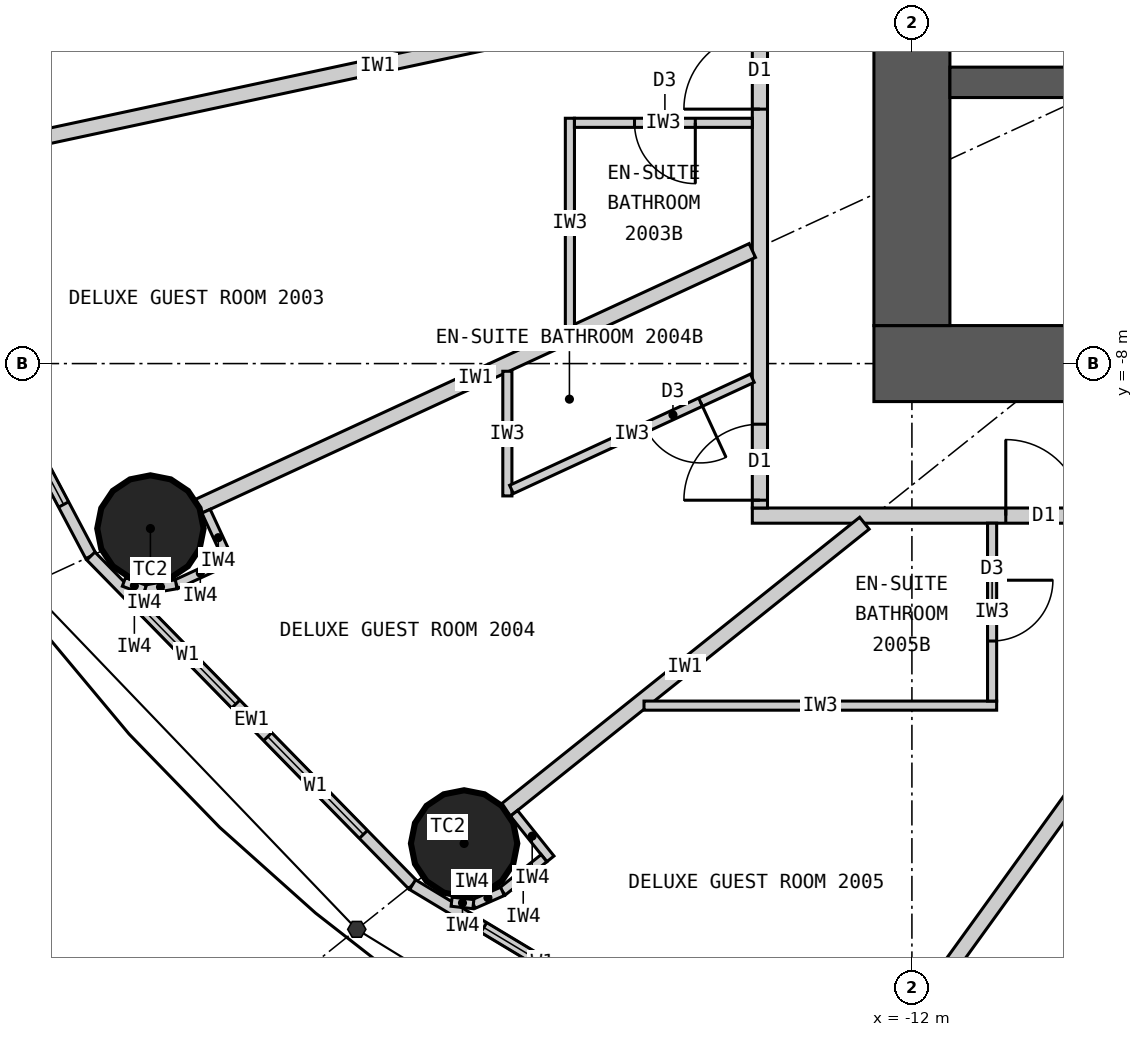
"""IFC4 building model, lengths in metres.
Left out: names, types, materials, properties, quantities, classifications, styles, units other than length and angle.
Written with IfcOpenShell. Run it as: python <this file> out.ifc"""

import sys

from ifc_helpers import new_model, si_unit, direction, frame, frame_2d, origin, origin_2d, place, context, subcontext, project, spatial, rectangle, circle, extrude, element, fill, save


model = new_model("IFC4")
c1 = context("Model", 3, precision=1e-05, world=origin(), true_north=direction((0.0, 1.0)))
c2 = subcontext(c1, "Body", "Model", "MODEL_VIEW")
j1 = project(units=[si_unit("LENGTHUNIT", "METRE"), si_unit("PLANEANGLEUNIT", "RADIAN")], contexts=[c1])
p1 = place(None, origin())
s1 = spatial("IfcSite", under=j1, at=p1, CompositionType="ELEMENT")
p2 = place(p1, origin())
s2 = spatial("IfcBuilding", under=s1, at=p2, CompositionType="ELEMENT")
p3 = place(p2, frame((0.0, 0.0, 80.4)))
s3 = spatial("IfcBuildingStorey", under=s2, at=p3, CompositionType="ELEMENT", Elevation=80.4)
for number, where, z_axis, x_axis in (
    (1, (-22.019, -10.17, 0.0), (0.0, 0.0, 1.0), (1.0, 0.0, 0.0)),
    (2, (-17.892, -14.313, 0.0), (0.0, 0.0, 1.0), (1.0, 0.0, 0.0)),
):
    element("IfcColumn", number, at=place(p3, frame(where, z_axis=z_axis, x_axis=x_axis)), inside=s3, PredefinedType="COLUMN", context=c2, shape_type="SweptSolid", body=[
        extrude(circle(Radius=0.7, at=origin_2d()), origin(), (0.0, 0.0, 1.0), 3.3),
    ])
p4 = place(p3, frame((12.5, -8.0, 0.0), z_axis=(0.0, 0.0, 1.0), x_axis=(-1.0, 0.0, 0.0)))
e3 = element("IfcWall", 3, at=p4, inside=s3, PredefinedType="SHEAR", context=c2, shape_type="SweptSolid", body=[
    extrude(rectangle(XDim=25.0, YDim=1.0, at=frame_2d((12.5, 0.0))), origin(), (0.0, 0.0, 1.0), 3.3),
])
p5 = place(p4, frame((11.2, 0.0, 0.0)))
e4 = element("IfcOpeningElement", 4, at=p5, cuts=e3, PredefinedType="OPENING", context=c2, shape_type="SweptSolid", body=[
    extrude(rectangle(XDim=1.2, YDim=2.2, at=frame_2d((0.6, 1.1))), frame((0.0, 0.51, 0.0), z_axis=(0.0, -1.0, 0.0), x_axis=(1.0, 0.0, 0.0)), (0.0, 0.0, 1.0), 1.02),
])
p6 = place(p4, frame((18.8, 0.0, 0.0)))
e5 = element("IfcOpeningElement", 5, at=p6, cuts=e3, PredefinedType="OPENING", context=c2, shape_type="SweptSolid", body=[
    extrude(rectangle(XDim=0.9, YDim=2.2, at=frame_2d((0.45, 1.1))), frame((0.0, 0.51, 0.0), z_axis=(0.0, -1.0, 0.0), x_axis=(1.0, 0.0, 0.0)), (0.0, 0.0, 1.0), 1.02),
])
p7 = place(p3, frame((-12.0, 7.5, 0.0), z_axis=(0.0, 0.0, 1.0), x_axis=(0.0, -1.0, 0.0)))
e6 = element("IfcWall", 6, at=p7, inside=s3, PredefinedType="SHEAR", context=c2, shape_type="SweptSolid", body=[
    extrude(rectangle(XDim=15.0, YDim=1.0, at=frame_2d((7.5, 0.0))), origin(), (0.0, 0.0, 1.0), 3.3),
])
p8 = place(p7, frame((6.6, 0.0, 0.0)))
e7 = element("IfcOpeningElement", 7, at=p8, cuts=e6, PredefinedType="OPENING", context=c2, shape_type="SweptSolid", body=[
    extrude(rectangle(XDim=1.8, YDim=2.2, at=frame_2d((0.9, 1.1))), frame((0.0, 0.51, 0.0), z_axis=(0.0, -1.0, 0.0), x_axis=(1.0, 0.0, 0.0)), (0.0, 0.0, 1.0), 1.02),
])
p9 = place(p3, frame((-11.5, -4.3, 0.0), z_axis=(0.0, 0.0, 1.0), x_axis=(1.0, 0.0, 0.0)))
e8 = element("IfcWall", 8, at=p9, inside=s3, PredefinedType="SHEAR", context=c2, shape_type="SweptSolid", body=[
    extrude(rectangle(XDim=23.0, YDim=0.4, at=frame_2d((11.5, 0.0))), origin(), (0.0, 0.0, 1.0), 3.3),
])
p10 = place(p3, frame((-25.482, -5.462, 0.0), z_axis=(0.0, 0.0, 1.0), x_axis=(0.467296867008, -0.884100468321, 0.0)))
e9 = element("IfcWall", 9, at=p10, inside=s3, PredefinedType="ELEMENTEDWALL", context=c2, shape_type="SweptSolid", body=[
    extrude(rectangle(XDim=5.734, YDim=0.15, at=frame_2d((2.867, 0.0))), origin(), (0.0, 0.0, 1.0), 3.12),
])
p11 = place(p10, frame((0.767, 0.0, 0.9)))
e10 = element("IfcOpeningElement", 10, at=p11, cuts=e9, PredefinedType="OPENING", context=c2, shape_type="SweptSolid", body=[
    extrude(rectangle(XDim=1.8, YDim=1.9, at=frame_2d((0.9, 0.95))), frame((0.0, 0.085, 0.0), z_axis=(0.0, -1.0, 0.0), x_axis=(1.0, 0.0, 0.0)), (0.0, 0.0, 1.0), 0.17),
])
p12 = place(p10, frame((3.167, 0.0, 0.9)))
e11 = element("IfcOpeningElement", 11, at=p12, cuts=e9, PredefinedType="OPENING", context=c2, shape_type="SweptSolid", body=[
    extrude(rectangle(XDim=1.8, YDim=1.9, at=frame_2d((0.9, 0.95))), frame((0.0, 0.085, 0.0), z_axis=(0.0, -1.0, 0.0), x_axis=(1.0, 0.0, 0.0)), (0.0, 0.0, 1.0), 0.17),
])
p13 = place(p3, frame((-22.803, -10.532, 0.0), z_axis=(0.0, 0.0, 1.0), x_axis=(0.699602905915, -0.714531856557, 0.0)))
e12 = element("IfcWall", 12, at=p13, inside=s3, PredefinedType="ELEMENTEDWALL", context=c2, shape_type="SweptSolid", body=[
    extrude(rectangle(XDim=6.051, YDim=0.15, at=frame_2d((3.025, 0.0))), origin(), (0.0, 0.0, 1.0), 3.12),
])
p14 = place(p13, frame((0.926, 0.0, 0.9)))
e13 = element("IfcOpeningElement", 13, at=p14, cuts=e12, PredefinedType="OPENING", context=c2, shape_type="SweptSolid", body=[
    extrude(rectangle(XDim=1.8, YDim=1.9, at=frame_2d((0.9, 0.95))), frame((0.0, 0.085, 0.0), z_axis=(0.0, -1.0, 0.0), x_axis=(1.0, 0.0, 0.0)), (0.0, 0.0, 1.0), 0.17),
])
p15 = place(p13, frame((3.325, 0.0, 0.9)))
e14 = element("IfcOpeningElement", 14, at=p15, cuts=e12, PredefinedType="OPENING", context=c2, shape_type="SweptSolid", body=[
    extrude(rectangle(XDim=1.8, YDim=1.9, at=frame_2d((0.9, 0.95))), frame((0.0, 0.085, 0.0), z_axis=(0.0, -1.0, 0.0), x_axis=(1.0, 0.0, 0.0)), (0.0, 0.0, 1.0), 0.17),
])
p16 = place(p3, frame((-18.57, -14.856, 0.0), z_axis=(0.0, 0.0, 1.0), x_axis=(0.856983180864, -0.515344377787, 0.0)))
e15 = element("IfcWall", 15, at=p16, inside=s3, PredefinedType="ELEMENTEDWALL", context=c2, shape_type="SweptSolid", body=[
    extrude(rectangle(XDim=6.386, YDim=0.15, at=frame_2d((3.193, 0.0))), origin(), (0.0, 0.0, 1.0), 3.12),
])
p17 = place(p16, frame((1.093, 0.0, 0.9)))
e16 = element("IfcOpeningElement", 16, at=p17, cuts=e15, PredefinedType="OPENING", context=c2, shape_type="SweptSolid", body=[
    extrude(rectangle(XDim=1.8, YDim=1.9, at=frame_2d((0.9, 0.95))), frame((0.0, 0.085, 0.0), z_axis=(0.0, -1.0, 0.0), x_axis=(1.0, 0.0, 0.0)), (0.0, 0.0, 1.0), 0.17),
])
p18 = place(p16, frame((3.493, 0.0, 0.9)))
e17 = element("IfcOpeningElement", 17, at=p18, cuts=e15, PredefinedType="OPENING", context=c2, shape_type="SweptSolid", body=[
    extrude(rectangle(XDim=1.8, YDim=1.9, at=frame_2d((0.9, 0.95))), frame((0.0, 0.085, 0.0), z_axis=(0.0, -1.0, 0.0), x_axis=(1.0, 0.0, 0.0)), (0.0, 0.0, 1.0), 0.17),
])
p19 = place(p3, frame((14.1, -10.0, 0.0), z_axis=(0.0, 0.0, 1.0), x_axis=(-1.0, 0.0, 0.0)))
e18 = element("IfcWall", 18, at=p19, inside=s3, PredefinedType="PARTITIONING", context=c2, shape_type="SweptSolid", body=[
    extrude(rectangle(XDim=28.2, YDim=0.2, at=frame_2d((14.1, 0.0))), origin(), (0.0, 0.0, 1.0), 3.12),
])
p20 = place(p19, frame((23.865, 0.0, 0.0)))
e19 = element("IfcOpeningElement", 19, at=p20, cuts=e18, PredefinedType="OPENING", context=c2, shape_type="SweptSolid", body=[
    extrude(rectangle(XDim=1.0, YDim=2.2, at=frame_2d((0.5, 1.1))), frame((0.0, 0.11, 0.0), z_axis=(0.0, -1.0, 0.0), x_axis=(1.0, 0.0, 0.0)), (0.0, 0.0, 1.0), 0.22),
])
p21 = place(p19, frame((18.529, 0.0, 0.0)))
e20 = element("IfcOpeningElement", 20, at=p21, cuts=e18, PredefinedType="OPENING", context=c2, shape_type="SweptSolid", body=[
    extrude(rectangle(XDim=1.0, YDim=2.2, at=frame_2d((0.5, 1.1))), frame((0.0, 0.11, 0.0), z_axis=(0.0, -1.0, 0.0), x_axis=(1.0, 0.0, 0.0)), (0.0, 0.0, 1.0), 0.22),
])
p22 = place(p19, frame((14.923, 0.0, 0.0)))
e21 = element("IfcOpeningElement", 21, at=p22, cuts=e18, PredefinedType="OPENING", context=c2, shape_type="SweptSolid", body=[
    extrude(rectangle(XDim=1.0, YDim=2.2, at=frame_2d((0.5, 1.1))), frame((0.0, 0.11, 0.0), z_axis=(0.0, -1.0, 0.0), x_axis=(1.0, 0.0, 0.0)), (0.0, 0.0, 1.0), 0.22),
])
p23 = place(p19, frame((2.801, 0.0, 0.0)))
e22 = element("IfcOpeningElement", 22, at=p23, cuts=e18, PredefinedType="OPENING", context=c2, shape_type="SweptSolid", body=[
    extrude(rectangle(XDim=1.0, YDim=2.2, at=frame_2d((0.5, 1.1))), frame((0.0, 0.11, 0.0), z_axis=(0.0, -1.0, 0.0), x_axis=(1.0, 0.0, 0.0)), (0.0, 0.0, 1.0), 0.22),
])
p24 = place(p3, frame((-14.0, 9.9, 0.0), z_axis=(0.0, 0.0, 1.0), x_axis=(0.0, -1.0, 0.0)))
e23 = element("IfcWall", 23, at=p24, inside=s3, PredefinedType="PARTITIONING", context=c2, shape_type="SweptSolid", body=[
    extrude(rectangle(XDim=19.8, YDim=0.2, at=frame_2d((9.9, 0.0))), origin(), (0.0, 0.0, 1.0), 3.12),
])
p25 = place(p24, frame((7.097, 0.0, 0.0)))
e24 = element("IfcOpeningElement", 24, at=p25, cuts=e23, PredefinedType="OPENING", context=c2, shape_type="SweptSolid", body=[
    extrude(rectangle(XDim=1.0, YDim=2.2, at=frame_2d((0.5, 1.1))), frame((0.0, 0.11, 0.0), z_axis=(0.0, -1.0, 0.0), x_axis=(1.0, 0.0, 0.0)), (0.0, 0.0, 1.0), 0.22),
])
p26 = place(p24, frame((10.778, 0.0, 0.0)))
e25 = element("IfcOpeningElement", 25, at=p26, cuts=e23, PredefinedType="OPENING", context=c2, shape_type="SweptSolid", body=[
    extrude(rectangle(XDim=1.0, YDim=2.2, at=frame_2d((0.5, 1.1))), frame((0.0, 0.11, 0.0), z_axis=(0.0, -1.0, 0.0), x_axis=(1.0, 0.0, 0.0)), (0.0, 0.0, 1.0), 0.22),
])
p27 = place(p24, frame((13.552, 0.0, 0.0)))
e26 = element("IfcOpeningElement", 26, at=p27, cuts=e23, PredefinedType="OPENING", context=c2, shape_type="SweptSolid", body=[
    extrude(rectangle(XDim=1.0, YDim=2.2, at=frame_2d((0.5, 1.1))), frame((0.0, 0.11, 0.0), z_axis=(0.0, -1.0, 0.0), x_axis=(1.0, 0.0, 0.0)), (0.0, 0.0, 1.0), 0.22),
])
p28 = place(p24, frame((18.698, 0.0, 0.0)))
e27 = element("IfcOpeningElement", 27, at=p28, cuts=e23, PredefinedType="OPENING", context=c2, shape_type="SweptSolid", body=[
    extrude(rectangle(XDim=1.0, YDim=2.2, at=frame_2d((0.5, 1.1))), frame((0.0, 0.11, 0.0), z_axis=(0.0, -1.0, 0.0), x_axis=(1.0, 0.0, 0.0)), (0.0, 0.0, 1.0), 0.22),
])
p29 = place(p24, frame((1.877, 0.0, 0.0)))
e28 = element("IfcOpeningElement", 28, at=p29, cuts=e23, PredefinedType="OPENING", context=c2, shape_type="SweptSolid", body=[
    extrude(rectangle(XDim=1.0, YDim=2.2, at=frame_2d((0.5, 1.1))), frame((0.0, 0.11, 0.0), z_axis=(0.0, -1.0, 0.0), x_axis=(1.0, 0.0, 0.0)), (0.0, 0.0, 1.0), 0.22),
])
p30 = place(p3, frame((-14.1, -3.022, 0.0), z_axis=(0.0, 0.0, 1.0), x_axis=(-0.977790014929, -0.209586943072, 0.0)))
e29 = element("IfcWall", 29, at=p30, inside=s3, PredefinedType="PARTITIONING", context=c2, shape_type="SweptSolid", body=[
    extrude(rectangle(XDim=10.087, YDim=0.2, at=frame_2d((5.043, 0.0))), origin(), (0.0, 0.0, 1.0), 2.32),
])
p31 = place(p3, frame((-14.1, -6.512, 0.0), z_axis=(0.0, 0.0, 1.0), x_axis=(-0.907832871056, -0.419332181247, 0.0)))
e30 = element("IfcWall", 30, at=p31, inside=s3, PredefinedType="PARTITIONING", context=c2, shape_type="SweptSolid", body=[
    extrude(rectangle(XDim=8.023, YDim=0.2, at=frame_2d((4.011, 0.0))), origin(), (0.0, 0.0, 1.0), 2.32),
])
p32 = place(p3, frame((-12.625, -10.1, 0.0), z_axis=(0.0, 0.0, 1.0), x_axis=(-0.780892451574, -0.624665493744, 0.0)))
e31 = element("IfcWall", 31, at=p32, inside=s3, PredefinedType="PARTITIONING", context=c2, shape_type="SweptSolid", body=[
    extrude(rectangle(XDim=6.045, YDim=0.2, at=frame_2d((3.022, 0.0))), origin(), (0.0, 0.0, 1.0), 2.32),
])
p33 = place(p3, frame((-7.289, -10.1, 0.0), z_axis=(0.0, 0.0, 1.0), x_axis=(-0.585198353053, -0.810890182197, 0.0)))
e32 = element("IfcWall", 32, at=p33, inside=s3, PredefinedType="PARTITIONING", context=c2, shape_type="SweptSolid", body=[
    extrude(rectangle(XDim=8.36, YDim=0.2, at=frame_2d((4.18, 0.0))), origin(), (0.0, 0.0, 1.0), 2.32),
])
p34 = place(p3, frame((-16.5, -7.521, 0.0), z_axis=(0.0, 0.0, 1.0), x_axis=(0.0, 1.0, 0.0)))
e33 = element("IfcWall", 33, at=p34, inside=s3, PredefinedType="PARTITIONING", context=c2, shape_type="SweptSolid", body=[
    extrude(rectangle(XDim=2.749, YDim=0.12, at=frame_2d((1.374, 0.0))), origin(), (0.0, 0.0, 1.0), 3.12),
])
p35 = place(p3, frame((-14.1, -4.833, 0.0), z_axis=(0.0, 0.0, 1.0), x_axis=(-1.0, 0.0, 0.0)))
e34 = element("IfcWall", 34, at=p35, inside=s3, PredefinedType="PARTITIONING", context=c2, shape_type="SweptSolid", body=[
    extrude(rectangle(XDim=2.34, YDim=0.12, at=frame_2d((1.17, 0.0))), origin(), (0.0, 0.0, 1.0), 3.12),
])
p36 = place(p35, frame((0.75, 0.0, 0.0)))
e35 = element("IfcOpeningElement", 35, at=p36, cuts=e34, PredefinedType="OPENING", context=c2, shape_type="SweptSolid", body=[
    extrude(rectangle(XDim=0.8, YDim=2.1, at=frame_2d((0.4, 1.05))), frame((0.0, 0.07, 0.0), z_axis=(0.0, -1.0, 0.0), x_axis=(1.0, 0.0, 0.0)), (0.0, 0.0, 1.0), 0.14),
])
p37 = place(p3, frame((-17.323, -8.101, 0.0), z_axis=(0.0, 0.0, 1.0), x_axis=(0.0, -1.0, 0.0)))
e36 = element("IfcWall", 36, at=p37, inside=s3, PredefinedType="PARTITIONING", context=c2, shape_type="SweptSolid", body=[
    extrude(rectangle(XDim=1.64, YDim=0.12, at=frame_2d((0.82, 0.0))), origin(), (0.0, 0.0, 1.0), 3.12),
])
p38 = place(p3, frame((-14.1, -8.193, 0.0), z_axis=(0.0, 0.0, 1.0), x_axis=(-0.907836493557, -0.419324338628, 0.0)))
e37 = element("IfcWall", 37, at=p38, inside=s3, PredefinedType="PARTITIONING", context=c2, shape_type="SweptSolid", body=[
    extrude(rectangle(XDim=3.49, YDim=0.12, at=frame_2d((1.745, 0.0))), origin(), (0.0, 0.0, 1.0), 3.12),
])
p39 = place(p38, frame((0.75, 0.0, 0.0)))
e38 = element("IfcOpeningElement", 38, at=p39, cuts=e37, PredefinedType="OPENING", context=c2, shape_type="SweptSolid", body=[
    extrude(rectangle(XDim=0.8, YDim=2.1, at=frame_2d((0.4, 1.05))), frame((0.0, 0.07, 0.0), z_axis=(0.0, -1.0, 0.0), x_axis=(1.0, 0.0, 0.0)), (0.0, 0.0, 1.0), 0.14),
])
p40 = place(p3, frame((-15.525, -12.5, 0.0), z_axis=(0.0, 0.0, 1.0), x_axis=(1.0, 0.0, 0.0)))
e39 = element("IfcWall", 39, at=p40, inside=s3, PredefinedType="PARTITIONING", context=c2, shape_type="SweptSolid", body=[
    extrude(rectangle(XDim=4.64, YDim=0.12, at=frame_2d((2.32, 0.0))), origin(), (0.0, 0.0, 1.0), 3.12),
])
p41 = place(p3, frame((-10.945, -10.1, 0.0), z_axis=(0.0, 0.0, 1.0), x_axis=(0.0, -1.0, 0.0)))
e40 = element("IfcWall", 40, at=p41, inside=s3, PredefinedType="PARTITIONING", context=c2, shape_type="SweptSolid", body=[
    extrude(rectangle(XDim=2.34, YDim=0.12, at=frame_2d((1.17, 0.0))), origin(), (0.0, 0.0, 1.0), 3.12),
])
p42 = place(p41, frame((0.75, 0.0, 0.0)))
e41 = element("IfcOpeningElement", 41, at=p42, cuts=e40, PredefinedType="OPENING", context=c2, shape_type="SweptSolid", body=[
    extrude(rectangle(XDim=0.8, YDim=2.1, at=frame_2d((0.4, 1.05))), frame((0.0, 0.07, 0.0), z_axis=(0.0, -1.0, 0.0), x_axis=(1.0, 0.0, 0.0)), (0.0, 0.0, 1.0), 0.14),
])
p43 = place(p3, frame((-21.287, -9.942, 0.0), z_axis=(0.0, 0.0, 1.0), x_axis=(0.419259891039, -0.907866258744, 0.0)))
e42 = element("IfcWall", 42, at=p43, inside=s3, PredefinedType="PARTITIONING", context=c2, shape_type="SweptSolid", body=[
    extrude(rectangle(XDim=0.768, YDim=0.12, at=frame_2d((0.384, 0.0))), origin(), (0.0, 0.0, 1.0), 3.12),
])
p44 = place(p3, frame((-21.045, -10.61, 0.0), z_axis=(0.0, 0.0, 1.0), x_axis=(-0.907877701396, -0.419235112208, 0.0)))
e43 = element("IfcWall", 43, at=p44, inside=s3, PredefinedType="PARTITIONING", context=c2, shape_type="SweptSolid", body=[
    extrude(rectangle(XDim=0.7, YDim=0.12, at=frame_2d((0.35, 0.0))), origin(), (0.0, 0.0, 1.0), 3.12),
])
p45 = place(p3, frame((-21.68, -10.903, 0.0), z_axis=(0.0, 0.0, 1.0), x_axis=(-0.985446622073, -0.169985161247, 0.0)))
e44 = element("IfcWall", 44, at=p45, inside=s3, PredefinedType="PARTITIONING", context=c2, shape_type="SweptSolid", body=[
    extrude(rectangle(XDim=0.418, YDim=0.12, at=frame_2d((0.209, 0.0))), origin(), (0.0, 0.0, 1.0), 3.12),
])
p46 = place(p3, frame((-22.092, -10.974, 0.0), z_axis=(0.0, 0.0, 1.0), x_axis=(-0.938428160676, 0.345474437912, 0.0)))
e45 = element("IfcWall", 45, at=p46, inside=s3, PredefinedType="PARTITIONING", context=c2, shape_type="SweptSolid", body=[
    extrude(rectangle(XDim=0.294, YDim=0.12, at=frame_2d((0.147, 0.0))), origin(), (0.0, 0.0, 1.0), 3.12),
])
p47 = place(p3, frame((-17.236, -13.917, 0.0), z_axis=(0.0, 0.0, 1.0), x_axis=(0.624695047554, -0.780868809443, 0.0)))
e46 = element("IfcWall", 46, at=p47, inside=s3, PredefinedType="PARTITIONING", context=c2, shape_type="SweptSolid", body=[
    extrude(rectangle(XDim=0.768, YDim=0.12, at=frame_2d((0.384, 0.0))), origin(), (0.0, 0.0, 1.0), 3.12),
])
p48 = place(p3, frame((-16.841, -14.507, 0.0), z_axis=(0.0, 0.0, 1.0), x_axis=(-0.780902834923, -0.62465251333, 0.0)))
e47 = element("IfcWall", 47, at=p48, inside=s3, PredefinedType="PARTITIONING", context=c2, shape_type="SweptSolid", body=[
    extrude(rectangle(XDim=0.7, YDim=0.12, at=frame_2d((0.35, 0.0))), origin(), (0.0, 0.0, 1.0), 3.12),
])
p49 = place(p3, frame((-17.387, -14.944, 0.0), z_axis=(0.0, 0.0, 1.0), x_axis=(-0.916036698064, -0.401094462441, 0.0)))
e48 = element("IfcWall", 48, at=p49, inside=s3, PredefinedType="PARTITIONING", context=c2, shape_type="SweptSolid", body=[
    extrude(rectangle(XDim=0.418, YDim=0.12, at=frame_2d((0.209, 0.0))), origin(), (0.0, 0.0, 1.0), 3.12),
])
p50 = place(p3, frame((-17.77, -15.112, 0.0), z_axis=(0.0, 0.0, 1.0), x_axis=(-0.993904401174, 0.110245368731, 0.0)))
e49 = element("IfcWall", 49, at=p50, inside=s3, PredefinedType="PARTITIONING", context=c2, shape_type="SweptSolid", body=[
    extrude(rectangle(XDim=0.288, YDim=0.12, at=frame_2d((0.144, 0.0))), origin(), (0.0, 0.0, 1.0), 3.12),
])
p51 = place(p12, origin())
e50 = element("IfcWindow", 50, at=p51, inside=s3, PartitioningType="SINGLE_PANEL", PredefinedType="WINDOW", context=c2, shape_type="SweptSolid", body=[
    extrude(rectangle(XDim=1.8, YDim=1.9, at=frame_2d((0.9, 0.95))), frame((0.0, 0.03, 0.0), z_axis=(0.0, -1.0, 0.0), x_axis=(1.0, 0.0, 0.0)), (0.0, 0.0, 1.0), 0.06),
])
fill(e11, e50)
p52 = place(p14, origin())
e51 = element("IfcWindow", 51, at=p52, inside=s3, PartitioningType="SINGLE_PANEL", PredefinedType="WINDOW", context=c2, shape_type="SweptSolid", body=[
    extrude(rectangle(XDim=1.8, YDim=1.9, at=frame_2d((0.9, 0.95))), frame((0.0, 0.03, 0.0), z_axis=(0.0, -1.0, 0.0), x_axis=(1.0, 0.0, 0.0)), (0.0, 0.0, 1.0), 0.06),
])
fill(e13, e51)
p53 = place(p15, origin())
e52 = element("IfcWindow", 52, at=p53, inside=s3, PartitioningType="SINGLE_PANEL", PredefinedType="WINDOW", context=c2, shape_type="SweptSolid", body=[
    extrude(rectangle(XDim=1.8, YDim=1.9, at=frame_2d((0.9, 0.95))), frame((0.0, 0.03, 0.0), z_axis=(0.0, -1.0, 0.0), x_axis=(1.0, 0.0, 0.0)), (0.0, 0.0, 1.0), 0.06),
])
fill(e14, e52)
p54 = place(p17, origin())
e53 = element("IfcWindow", 53, at=p54, inside=s3, PartitioningType="SINGLE_PANEL", PredefinedType="WINDOW", context=c2, shape_type="SweptSolid", body=[
    extrude(rectangle(XDim=1.8, YDim=1.9, at=frame_2d((0.9, 0.95))), frame((0.0, 0.03, 0.0), z_axis=(0.0, -1.0, 0.0), x_axis=(1.0, 0.0, 0.0)), (0.0, 0.0, 1.0), 0.06),
])
fill(e16, e53)
p55 = place(p36, origin())
e54 = element("IfcDoor", 54, at=p55, inside=s3, OperationType="SINGLE_SWING_LEFT", PredefinedType="DOOR", context=c2, shape_type="SweptSolid", body=[
    extrude(rectangle(XDim=0.8, YDim=2.1, at=frame_2d((0.4, 1.05))), frame((0.0, 0.025, 0.0), z_axis=(0.0, -1.0, 0.0), x_axis=(1.0, 0.0, 0.0)), (0.0, 0.0, 1.0), 0.05),
])
fill(e35, e54)
p56 = place(p27, origin())
e55 = element("IfcDoor", 55, at=p56, inside=s3, OperationType="SINGLE_SWING_RIGHT", PredefinedType="DOOR", context=c2, shape_type="SweptSolid", body=[
    extrude(rectangle(XDim=1.0, YDim=2.2, at=frame_2d((0.5, 1.1))), frame((0.0, 0.025, 0.0), z_axis=(0.0, -1.0, 0.0), x_axis=(1.0, 0.0, 0.0)), (0.0, 0.0, 1.0), 0.05),
])
fill(e26, e55)
p57 = place(p39, origin())
e56 = element("IfcDoor", 56, at=p57, inside=s3, OperationType="SINGLE_SWING_LEFT", PredefinedType="DOOR", context=c2, shape_type="SweptSolid", body=[
    extrude(rectangle(XDim=0.8, YDim=2.1, at=frame_2d((0.4, 1.05))), frame((0.0, 0.025, 0.0), z_axis=(0.0, -1.0, 0.0), x_axis=(1.0, 0.0, 0.0)), (0.0, 0.0, 1.0), 0.05),
])
fill(e38, e56)
p58 = place(p28, origin())
e57 = element("IfcDoor", 57, at=p58, inside=s3, OperationType="SINGLE_SWING_RIGHT", PredefinedType="DOOR", context=c2, shape_type="SweptSolid", body=[
    extrude(rectangle(XDim=1.0, YDim=2.2, at=frame_2d((0.5, 1.1))), frame((0.0, 0.025, 0.0), z_axis=(0.0, -1.0, 0.0), x_axis=(1.0, 0.0, 0.0)), (0.0, 0.0, 1.0), 0.05),
])
fill(e27, e57)
p59 = place(p42, origin())
e58 = element("IfcDoor", 58, at=p59, inside=s3, OperationType="SINGLE_SWING_LEFT", PredefinedType="DOOR", context=c2, shape_type="SweptSolid", body=[
    extrude(rectangle(XDim=0.8, YDim=2.1, at=frame_2d((0.4, 1.05))), frame((0.0, 0.025, 0.0), z_axis=(0.0, -1.0, 0.0), x_axis=(1.0, 0.0, 0.0)), (0.0, 0.0, 1.0), 0.05),
])
fill(e41, e58)
p60 = place(p20, origin())
e59 = element("IfcDoor", 59, at=p60, inside=s3, OperationType="SINGLE_SWING_RIGHT", PredefinedType="DOOR", context=c2, shape_type="SweptSolid", body=[
    extrude(rectangle(XDim=1.0, YDim=2.2, at=frame_2d((0.5, 1.1))), frame((0.0, 0.025, 0.0), z_axis=(0.0, -1.0, 0.0), x_axis=(1.0, 0.0, 0.0)), (0.0, 0.0, 1.0), 0.05),
])
fill(e19, e59)
save(model, sys.argv[1])
